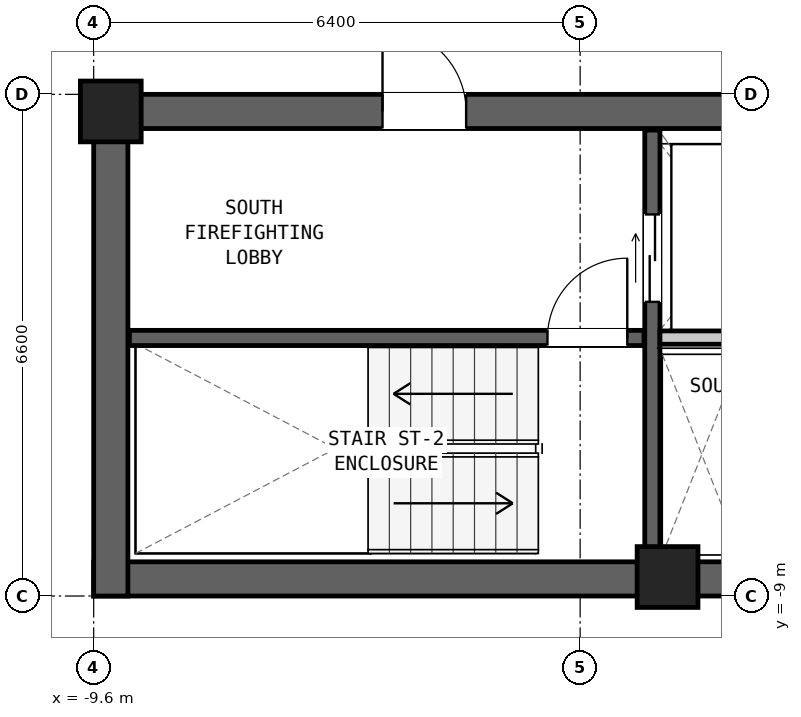
"""IFC4 building model, lengths in metres.
Left out: names, types, materials, properties, quantities, classifications, styles, units other than length and angle.
Written with IfcOpenShell. Run it as: python <this file> out.ifc"""

import sys

from ifc_helpers import new_model, si_unit, direction, frame, frame_2d, origin, origin_2d, place, context, subcontext, project, spatial, rectangle, extrude, element, fill, save


model = new_model("IFC4")
c1 = context("Model", 3, precision=1e-05, world=origin(), true_north=direction((0.0, 1.0)))
c2 = subcontext(c1, "Body", "Model", "MODEL_VIEW")
j1 = project(units=[si_unit("LENGTHUNIT", "METRE"), si_unit("PLANEANGLEUNIT", "RADIAN")], contexts=[c1])
p1 = place(None, origin())
s1 = spatial("IfcSite", under=j1, at=p1, CompositionType="ELEMENT")
p2 = place(p1, origin())
s2 = spatial("IfcBuilding", under=s1, at=p2, CompositionType="ELEMENT")
p3 = place(p2, frame((0.0, 0.0, 252.0)))
s3 = spatial("IfcBuildingStorey", under=s2, at=p3, CompositionType="ELEMENT", Elevation=252.0)
p4 = place(p3, frame((-9.6, -8.775, 0.0), z_axis=(0.0, 0.0, 1.0), x_axis=(1.0, 0.0, 0.0)))
e1 = element("IfcWall", 1, at=p4, inside=s3, PredefinedType="SHEAR", context=c2, shape_type="SweptSolid", body=[
    extrude(rectangle(XDim=19.2, YDim=0.45, at=frame_2d((9.6, 0.0))), origin(), (0.0, 0.0, 1.0), 3.05),
])
p5 = place(p3, frame((-9.6, -2.625, 0.0), z_axis=(0.0, 0.0, 1.0), x_axis=(1.0, 0.0, 0.0)))
e2 = element("IfcWall", 2, at=p5, inside=s3, PredefinedType="SHEAR", context=c2, shape_type="SweptSolid", body=[
    extrude(rectangle(XDim=19.2, YDim=0.45, at=frame_2d((9.6, 0.0))), origin(), (0.0, 0.0, 1.0), 3.05),
])
p6 = place(p5, frame((3.8, 0.0, 0.0)))
e3 = element("IfcOpeningElement", 3, at=p6, cuts=e2, PredefinedType="OPENING", context=c2, shape_type="SweptSolid", body=[
    extrude(rectangle(XDim=1.1, YDim=2.08, at=frame_2d((0.55, 1.04))), frame((0.0, 0.237, 0.0), z_axis=(0.0, -1.0, 0.0), x_axis=(1.0, 0.0, 0.0)), (0.0, 0.0, 1.0), 0.474),
])
p7 = place(p5, frame((10.8, 0.0, 0.0)))
e4 = element("IfcOpeningElement", 4, at=p7, cuts=e2, PredefinedType="OPENING", context=c2, shape_type="SweptSolid", body=[
    extrude(rectangle(XDim=0.95, YDim=2.1, at=frame_2d((0.475, 1.05))), frame((0.0, 0.237, 0.0), z_axis=(0.0, -1.0, 0.0), x_axis=(1.0, 0.0, 0.0)), (0.0, 0.0, 1.0), 0.474),
])
p8 = place(p5, frame((14.8, 0.0, 0.0)))
e5 = element("IfcOpeningElement", 5, at=p8, cuts=e2, PredefinedType="OPENING", context=c2, shape_type="SweptSolid", body=[
    extrude(rectangle(XDim=1.6, YDim=2.12, at=frame_2d((0.8, 1.06))), frame((0.0, 0.237, 0.0), z_axis=(0.0, -1.0, 0.0), x_axis=(1.0, 0.0, 0.0)), (0.0, 0.0, 1.0), 0.474),
])
p9 = place(p3, frame((-9.375, -9.0, 0.0), z_axis=(0.0, 0.0, 1.0), x_axis=(0.0, 1.0, 0.0)))
e6 = element("IfcWall", 6, at=p9, inside=s3, PredefinedType="SHEAR", context=c2, shape_type="SweptSolid", body=[
    extrude(rectangle(XDim=6.6, YDim=0.45, at=frame_2d((3.3, 0.0))), origin(), (0.0, 0.0, 1.0), 3.05),
])
for number, where, z_axis, x_axis in (
    (7, (-9.375, -2.625, 0.0), (0.0, 0.0, 1.0), (1.0, 0.0, 0.0)),
    (8, (-2.05, -8.75, 0.0), (0.0, 0.0, 1.0), (1.0, 0.0, 0.0)),
):
    element("IfcColumn", number, at=place(p3, frame(where, z_axis=z_axis, x_axis=x_axis)), inside=s3, PredefinedType="COLUMN", context=c2, shape_type="SweptSolid", body=[
        extrude(rectangle(XDim=0.8, YDim=0.8, at=origin_2d()), origin(), (0.0, 0.0, 1.0), 3.05),
    ])
p10 = place(p3, frame((-9.13, -5.605, 0.0), z_axis=(0.0, 0.0, 1.0), x_axis=(1.0, 0.0, 0.0)))
e9 = element("IfcWall", 9, at=p10, inside=s3, PredefinedType="SHEAR", context=c2, shape_type="SweptSolid", body=[
    extrude(rectangle(XDim=6.77, YDim=0.2, at=frame_2d((3.385, 0.0))), origin(), (0.0, 0.0, 1.0), 2.86),
])
p11 = place(p10, frame((5.5, 0.0, 0.0)))
e10 = element("IfcOpeningElement", 10, at=p11, cuts=e9, PredefinedType="OPENING", context=c2, shape_type="SweptSolid", body=[
    extrude(rectangle(XDim=1.05, YDim=2.08, at=frame_2d((0.525, 1.04))), frame((0.0, 0.112, 0.0), z_axis=(0.0, -1.0, 0.0), x_axis=(1.0, 0.0, 0.0)), (0.0, 0.0, 1.0), 0.224),
])
p12 = place(p3, frame((-2.25, -8.53, 0.0), z_axis=(0.0, 0.0, 1.0), x_axis=(0.0, 1.0, 0.0)))
e11 = element("IfcWall", 11, at=p12, inside=s3, PredefinedType="SHEAR", context=c2, shape_type="SweptSolid", body=[
    extrude(rectangle(XDim=5.66, YDim=0.2, at=frame_2d((2.83, 0.0))), origin(), (0.0, 0.0, 1.0), 2.86),
])
p13 = place(p12, frame((3.4, 0.0, 0.0)))
e12 = element("IfcOpeningElement", 12, at=p13, cuts=e11, PredefinedType="OPENING", context=c2, shape_type="SweptSolid", body=[
    extrude(rectangle(XDim=1.15, YDim=2.08, at=frame_2d((0.575, 1.04))), frame((0.0, 0.112, 0.0), z_axis=(0.0, -1.0, 0.0), x_axis=(1.0, 0.0, 0.0)), (0.0, 0.0, 1.0), 0.224),
])
p14 = place(p3, frame((-2.15, -5.6, 0.0), z_axis=(0.0, 0.0, 1.0), x_axis=(1.0, 0.0, 0.0)))
e13 = element("IfcWall", 13, at=p14, inside=s3, PredefinedType="PARTITIONING", context=c2, shape_type="SweptSolid", body=[
    extrude(rectangle(XDim=1.97, YDim=0.175, at=frame_2d((0.985, 0.0))), origin(), (0.0, 0.0, 1.0), 2.86),
])
p15 = place(p11, origin())
e14 = element("IfcDoor", 14, at=p15, inside=s3, OperationType="SINGLE_SWING_RIGHT", PredefinedType="DOOR", context=c2, shape_type="SweptSolid", body=[
    extrude(rectangle(XDim=1.05, YDim=2.08, at=frame_2d((0.525, 1.04))), frame((0.0, 0.025, 0.0), z_axis=(0.0, -1.0, 0.0), x_axis=(1.0, 0.0, 0.0)), (0.0, 0.0, 1.0), 0.05),
])
fill(e10, e14)
p16 = place(p6, origin())
e15 = element("IfcDoor", 15, at=p16, inside=s3, OperationType="SINGLE_SWING_LEFT", PredefinedType="DOOR", context=c2, shape_type="SweptSolid", body=[
    extrude(rectangle(XDim=1.1, YDim=2.08, at=frame_2d((0.55, 1.04))), frame((0.0, 0.025, 0.0), z_axis=(0.0, -1.0, 0.0), x_axis=(1.0, 0.0, 0.0)), (0.0, 0.0, 1.0), 0.05),
])
fill(e3, e15)
p17 = place(p13, origin())
e16 = element("IfcDoor", 16, at=p17, inside=s3, OperationType="DOUBLE_DOOR_SLIDING", PredefinedType="DOOR", context=c2, shape_type="SweptSolid", body=[
    extrude(rectangle(XDim=1.15, YDim=2.08, at=frame_2d((0.575, 1.04))), frame((0.0, 0.025, 0.0), z_axis=(0.0, -1.0, 0.0), x_axis=(1.0, 0.0, 0.0)), (0.0, 0.0, 1.0), 0.05),
])
fill(e12, e16)
save(model, sys.argv[1])
